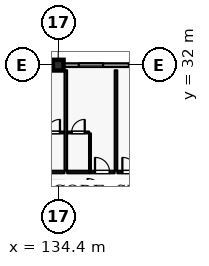
"""IFC4 building model, lengths in metres.
Left out: names, types, materials, properties, quantities, classifications, styles, units other than length and angle.
Written with IfcOpenShell. Run it as: python <this file> out.ifc"""

import sys

from ifc_helpers import new_model, si_unit, direction, frame, frame_2d, origin, origin_2d, place, context, subcontext, project, spatial, rectangle, extrude, element, fill, save


model = new_model("IFC4")
c1 = context("Model", 3, precision=1e-05, world=origin(), true_north=direction((0.0, 1.0)))
c2 = subcontext(c1, "Body", "Model", "MODEL_VIEW")
j1 = project(units=[si_unit("LENGTHUNIT", "METRE"), si_unit("PLANEANGLEUNIT", "RADIAN")], contexts=[c1])
p1 = place(None, origin())
s1 = spatial("IfcSite", under=j1, at=p1, CompositionType="ELEMENT")
p2 = place(p1, origin())
s2 = spatial("IfcBuilding", under=s1, at=p2, CompositionType="ELEMENT")
p3 = place(p2, frame((0.0, 0.0, 32.4)))
s3 = spatial("IfcBuildingStorey", under=s2, at=p3, CompositionType="ELEMENT", Elevation=32.4)
p4 = place(p3, frame((134.4, 32.0, 0.0), z_axis=(0.0, 0.0, 1.0), x_axis=(1.0, 0.0, 0.0)))
e1 = element("IfcColumn", 1, at=p4, inside=s3, PredefinedType="COLUMN", context=c2, shape_type="SweptSolid", body=[
    extrude(rectangle(XDim=0.7, YDim=0.7, at=origin_2d()), origin(), (0.0, 0.0, 1.0), 3.6),
])
p5 = place(p3, frame((134.4, 24.0, 0.0), z_axis=(0.0, 0.0, 1.0), x_axis=(1.0, 0.0, 0.0)))
e2 = element("IfcColumn", 2, at=p5, inside=s3, PredefinedType="COLUMN", context=c2, shape_type="SweptSolid", body=[
    extrude(rectangle(XDim=0.6, YDim=0.6, at=origin_2d()), origin(), (0.0, 0.0, 1.0), 3.6),
])
p6 = place(p3, frame((126.35, 32.0, 0.0), z_axis=(0.0, 0.0, 1.0), x_axis=(1.0, 0.0, 0.0)))
e3 = element("IfcWall", 3, at=p6, inside=s3, PredefinedType="SOLIDWALL", context=c2, shape_type="SweptSolid", body=[
    extrude(rectangle(XDim=7.7, YDim=0.24, at=frame_2d((3.85, 0.0))), origin(), (0.0, 0.0, 1.0), 2.94),
])
p7 = place(p6, frame((0.125, 0.0, 0.8)))
e4 = element("IfcOpeningElement", 4, at=p7, cuts=e3, PredefinedType="OPENING", context=c2, shape_type="SweptSolid", body=[
    extrude(rectangle(XDim=1.6, YDim=1.6, at=frame_2d((0.8, 0.8))), frame((0.0, 0.13, 0.0), z_axis=(0.0, -1.0, 0.0), x_axis=(1.0, 0.0, 0.0)), (0.0, 0.0, 1.0), 0.26),
])
p8 = place(p6, frame((2.8, 0.0, 0.8)))
e5 = element("IfcOpeningElement", 5, at=p8, cuts=e3, PredefinedType="OPENING", context=c2, shape_type="SweptSolid", body=[
    extrude(rectangle(XDim=1.6, YDim=1.6, at=frame_2d((0.8, 0.8))), frame((0.0, 0.13, 0.0), z_axis=(0.0, -1.0, 0.0), x_axis=(1.0, 0.0, 0.0)), (0.0, 0.0, 1.0), 0.26),
])
p9 = place(p6, frame((5.725, 0.0, 0.8)))
e6 = element("IfcOpeningElement", 6, at=p9, cuts=e3, PredefinedType="OPENING", context=c2, shape_type="SweptSolid", body=[
    extrude(rectangle(XDim=1.6, YDim=1.6, at=frame_2d((0.8, 0.8))), frame((0.0, 0.13, 0.0), z_axis=(0.0, -1.0, 0.0), x_axis=(1.0, 0.0, 0.0)), (0.0, 0.0, 1.0), 0.26),
])
p10 = place(p3, frame((134.75, 32.0, 0.0), z_axis=(0.0, 0.0, 1.0), x_axis=(1.0, 0.0, 0.0)))
e7 = element("IfcWall", 7, at=p10, inside=s3, PredefinedType="SOLIDWALL", context=c2, shape_type="SweptSolid", body=[
    extrude(rectangle(XDim=7.7, YDim=0.24, at=frame_2d((3.85, 0.0))), origin(), (0.0, 0.0, 1.0), 2.94),
])
p11 = place(p10, frame((1.0, 0.0, 0.8)))
e8 = element("IfcOpeningElement", 8, at=p11, cuts=e7, PredefinedType="OPENING", context=c2, shape_type="SweptSolid", body=[
    extrude(rectangle(XDim=1.6, YDim=1.6, at=frame_2d((0.8, 0.8))), frame((0.0, 0.13, 0.0), z_axis=(0.0, -1.0, 0.0), x_axis=(1.0, 0.0, 0.0)), (0.0, 0.0, 1.0), 0.26),
])
p12 = place(p10, frame((4.3, 0.0, 0.8)))
e9 = element("IfcOpeningElement", 9, at=p12, cuts=e7, PredefinedType="OPENING", context=c2, shape_type="SweptSolid", body=[
    extrude(rectangle(XDim=1.6, YDim=1.6, at=frame_2d((0.8, 0.8))), frame((0.0, 0.13, 0.0), z_axis=(0.0, -1.0, 0.0), x_axis=(1.0, 0.0, 0.0)), (0.0, 0.0, 1.0), 0.26),
])
p13 = place(p3, frame((133.32, 24.97, 0.0), z_axis=(0.0, 0.0, 1.0), x_axis=(1.0, 0.0, 0.0)))
e10 = element("IfcWall", 10, at=p13, inside=s3, PredefinedType="PARTITIONING", context=c2, shape_type="SweptSolid", body=[
    extrude(rectangle(XDim=1.49, YDim=0.16, at=frame_2d((0.745, 0.0))), origin(), (0.0, 0.0, 1.0), 3.335),
])
p14 = place(p3, frame((133.37, 27.57, 0.0), z_axis=(0.0, 0.0, 1.0), x_axis=(1.0, 0.0, 0.0)))
e11 = element("IfcWall", 11, at=p14, inside=s3, PredefinedType="PARTITIONING", context=c2, shape_type="SweptSolid", body=[
    extrude(rectangle(XDim=1.43, YDim=0.115, at=frame_2d((0.715, 0.0))), origin(), (0.0, 0.0, 1.0), 3.335),
])
p15 = place(p14, frame((0.285, 0.0, 0.0)))
e12 = element("IfcOpeningElement", 12, at=p15, cuts=e11, PredefinedType="OPENING", context=c2, shape_type="SweptSolid", body=[
    extrude(rectangle(XDim=0.86, YDim=2.12, at=frame_2d((0.43, 1.06))), frame((0.0, 0.067, 0.0), z_axis=(0.0, -1.0, 0.0), x_axis=(1.0, 0.0, 0.0)), (0.0, 0.0, 1.0), 0.135),
])
p16 = place(p3, frame((134.99, 24.97, 0.0), z_axis=(0.0, 0.0, 1.0), x_axis=(1.0, 0.0, 0.0)))
e13 = element("IfcWall", 13, at=p16, inside=s3, PredefinedType="PARTITIONING", context=c2, shape_type="SweptSolid", body=[
    extrude(rectangle(XDim=1.49, YDim=0.16, at=frame_2d((0.745, 0.0))), origin(), (0.0, 0.0, 1.0), 3.335),
])
p17 = place(p3, frame((136.49, 24.97, 0.0), z_axis=(0.0, 0.0, 1.0), x_axis=(1.0, 0.0, 0.0)))
e14 = element("IfcWall", 14, at=p17, inside=s3, PredefinedType="PARTITIONING", context=c2, shape_type="SweptSolid", body=[
    extrude(rectangle(XDim=1.62, YDim=0.16, at=frame_2d((0.81, 0.0))), origin(), (0.0, 0.0, 1.0), 3.335),
])
p18 = place(p17, frame((0.33, 0.0, 0.0)))
e15 = element("IfcOpeningElement", 15, at=p18, cuts=e14, PredefinedType="OPENING", context=c2, shape_type="SweptSolid", body=[
    extrude(rectangle(XDim=0.96, YDim=2.2, at=frame_2d((0.48, 1.1))), frame((0.0, 0.09, 0.0), z_axis=(0.0, -1.0, 0.0), x_axis=(1.0, 0.0, 0.0)), (0.0, 0.0, 1.0), 0.18),
])
p19 = place(p3, frame((136.49, 25.06, 0.0), z_axis=(0.0, 0.0, 1.0), x_axis=(0.0, 1.0, 0.0)))
e16 = element("IfcWall", 16, at=p19, inside=s3, PredefinedType="PARTITIONING", context=c2, shape_type="SweptSolid", body=[
    extrude(rectangle(XDim=2.45, YDim=0.115, at=frame_2d((1.225, 0.0))), origin(), (0.0, 0.0, 1.0), 3.335),
])
p20 = place(p3, frame((135.0, 27.57, 0.0), z_axis=(0.0, 0.0, 1.0), x_axis=(1.0, 0.0, 0.0)))
e17 = element("IfcWall", 17, at=p20, inside=s3, PredefinedType="PARTITIONING", context=c2, shape_type="SweptSolid", body=[
    extrude(rectangle(XDim=1.43, YDim=0.115, at=frame_2d((0.715, 0.0))), origin(), (0.0, 0.0, 1.0), 3.335),
])
p21 = place(p20, frame((0.285, 0.0, 0.0)))
e18 = element("IfcOpeningElement", 18, at=p21, cuts=e17, PredefinedType="OPENING", context=c2, shape_type="SweptSolid", body=[
    extrude(rectangle(XDim=0.86, YDim=2.12, at=frame_2d((0.43, 1.06))), frame((0.0, 0.067, 0.0), z_axis=(0.0, -1.0, 0.0), x_axis=(1.0, 0.0, 0.0)), (0.0, 0.0, 1.0), 0.135),
])
p22 = place(p3, frame((134.9, 25.06, 0.0), z_axis=(0.0, 0.0, 1.0), x_axis=(0.0, 1.0, 0.0)))
e19 = element("IfcWall", 19, at=p22, inside=s3, PredefinedType="PARTITIONING", context=c2, shape_type="SweptSolid", body=[
    extrude(rectangle(XDim=6.6, YDim=0.16, at=frame_2d((3.3, 0.0))), origin(), (0.0, 0.0, 1.0), 3.335),
])
p23 = place(p3, frame((138.29, 24.97, 0.0), z_axis=(0.0, 0.0, 1.0), x_axis=(1.0, 0.0, 0.0)))
e20 = element("IfcWall", 20, at=p23, inside=s3, PredefinedType="PARTITIONING", context=c2, shape_type="SweptSolid", body=[
    extrude(rectangle(XDim=1.62, YDim=0.16, at=frame_2d((0.81, 0.0))), origin(), (0.0, 0.0, 1.0), 3.335),
])
p24 = place(p23, frame((0.33, 0.0, 0.0)))
e21 = element("IfcOpeningElement", 21, at=p24, cuts=e20, PredefinedType="OPENING", context=c2, shape_type="SweptSolid", body=[
    extrude(rectangle(XDim=0.96, YDim=2.2, at=frame_2d((0.48, 1.1))), frame((0.0, 0.09, 0.0), z_axis=(0.0, -1.0, 0.0), x_axis=(1.0, 0.0, 0.0)), (0.0, 0.0, 1.0), 0.18),
])
p25 = place(p3, frame((138.2, 25.06, 0.0), z_axis=(0.0, 0.0, 1.0), x_axis=(0.0, 1.0, 0.0)))
e22 = element("IfcWall", 22, at=p25, inside=s3, PredefinedType="PARTITIONING", context=c2, shape_type="SweptSolid", body=[
    extrude(rectangle(XDim=6.6, YDim=0.16, at=frame_2d((3.3, 0.0))), origin(), (0.0, 0.0, 1.0), 3.335),
])
p26 = place(p11, origin())
e23 = element("IfcWindow", 23, at=p26, inside=s3, PartitioningType="SINGLE_PANEL", PredefinedType="WINDOW", context=c2, shape_type="SweptSolid", body=[
    extrude(rectangle(XDim=1.6, YDim=1.6, at=frame_2d((0.8, 0.8))), frame((0.0, 0.03, 0.0), z_axis=(0.0, -1.0, 0.0), x_axis=(1.0, 0.0, 0.0)), (0.0, 0.0, 1.0), 0.06),
])
fill(e8, e23)
p27 = place(p12, origin())
e24 = element("IfcWindow", 24, at=p27, inside=s3, PartitioningType="SINGLE_PANEL", PredefinedType="WINDOW", context=c2, shape_type="SweptSolid", body=[
    extrude(rectangle(XDim=1.6, YDim=1.6, at=frame_2d((0.8, 0.8))), frame((0.0, 0.03, 0.0), z_axis=(0.0, -1.0, 0.0), x_axis=(1.0, 0.0, 0.0)), (0.0, 0.0, 1.0), 0.06),
])
fill(e9, e24)
p28 = place(p15, origin())
e25 = element("IfcDoor", 25, at=p28, inside=s3, OperationType="SINGLE_SWING_RIGHT", PredefinedType="DOOR", context=c2, shape_type="SweptSolid", body=[
    extrude(rectangle(XDim=0.86, YDim=2.12, at=frame_2d((0.43, 1.06))), frame((0.0, 0.025, 0.0), z_axis=(0.0, -1.0, 0.0), x_axis=(1.0, 0.0, 0.0)), (0.0, 0.0, 1.0), 0.05),
])
fill(e12, e25)
p29 = place(p18, origin())
e26 = element("IfcDoor", 26, at=p29, inside=s3, OperationType="SINGLE_SWING_LEFT", PredefinedType="DOOR", context=c2, shape_type="SweptSolid", body=[
    extrude(rectangle(XDim=0.96, YDim=2.2, at=frame_2d((0.48, 1.1))), frame((0.0, 0.025, 0.0), z_axis=(0.0, -1.0, 0.0), x_axis=(1.0, 0.0, 0.0)), (0.0, 0.0, 1.0), 0.05),
])
fill(e15, e26)
p30 = place(p21, origin())
e27 = element("IfcDoor", 27, at=p30, inside=s3, OperationType="SINGLE_SWING_RIGHT", PredefinedType="DOOR", context=c2, shape_type="SweptSolid", body=[
    extrude(rectangle(XDim=0.86, YDim=2.12, at=frame_2d((0.43, 1.06))), frame((0.0, 0.025, 0.0), z_axis=(0.0, -1.0, 0.0), x_axis=(1.0, 0.0, 0.0)), (0.0, 0.0, 1.0), 0.05),
])
fill(e18, e27)
p31 = place(p24, origin())
e28 = element("IfcDoor", 28, at=p31, inside=s3, OperationType="SINGLE_SWING_LEFT", PredefinedType="DOOR", context=c2, shape_type="SweptSolid", body=[
    extrude(rectangle(XDim=0.96, YDim=2.2, at=frame_2d((0.48, 1.1))), frame((0.0, 0.025, 0.0), z_axis=(0.0, -1.0, 0.0), x_axis=(1.0, 0.0, 0.0)), (0.0, 0.0, 1.0), 0.05),
])
fill(e21, e28)
save(model, sys.argv[1])
